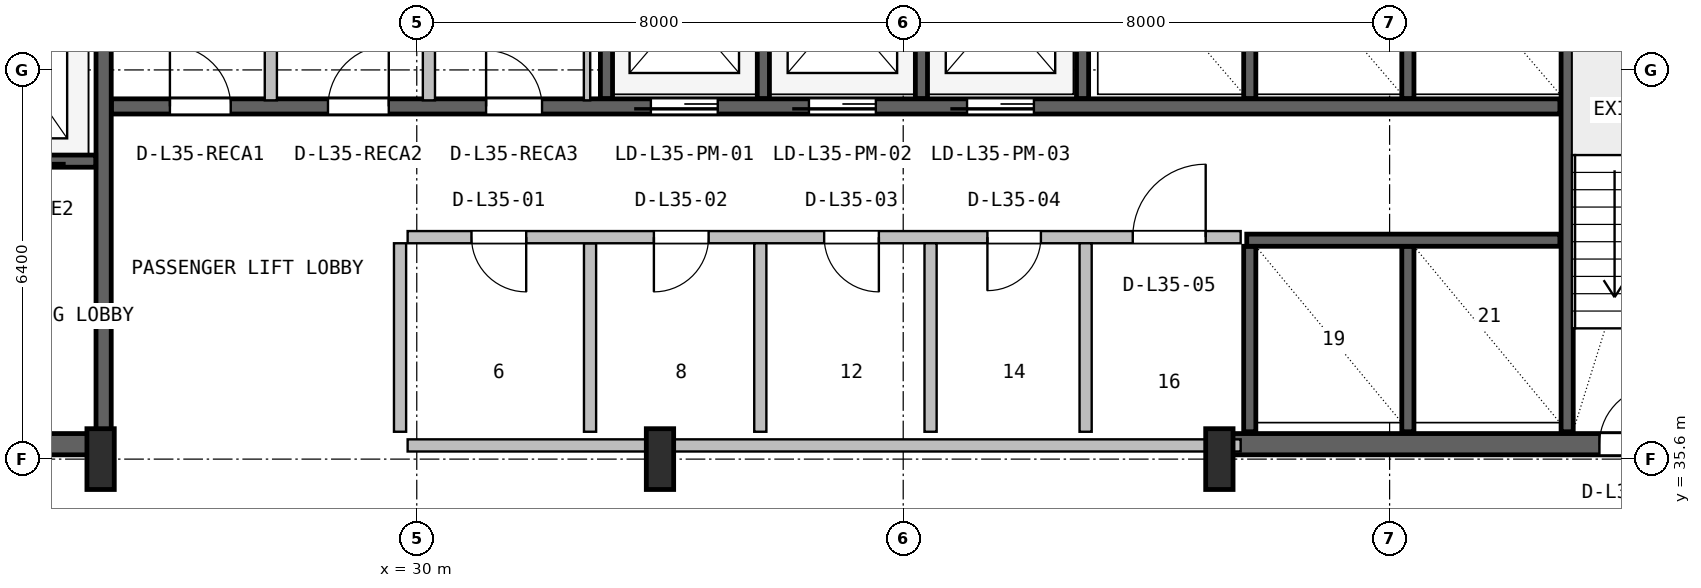
"""IFC4 building model, lengths in metres.
Left out: names, types, materials, properties, quantities, classifications, styles, units other than length and angle.
Written with IfcOpenShell. Run it as: python <this file> out.ifc"""

import sys

from ifc_helpers import new_model, si_unit, direction, frame, frame_2d, origin, origin_2d, place, context, subcontext, project, spatial, rectangle, i_section, extrude, source, transform, mapped, element, fill, save


model = new_model("IFC4")
c1 = context("Model", 3, precision=1e-05, world=origin(), true_north=direction((0.0, 1.0)))
c2 = subcontext(c1, "Body", "Model", "MODEL_VIEW")
j1 = project(units=[si_unit("LENGTHUNIT", "METRE"), si_unit("PLANEANGLEUNIT", "RADIAN")], contexts=[c1])
p1 = place(None, origin())
s1 = spatial("IfcSite", under=j1, at=p1, CompositionType="ELEMENT")
p2 = place(p1, origin())
s2 = spatial("IfcBuilding", under=s1, at=p2, CompositionType="ELEMENT")
p3 = place(p2, frame((0.0, 0.0, 145.8)))
s3 = spatial("IfcBuildingStorey", under=s2, at=p3, CompositionType="ELEMENT", Elevation=145.8)
p4 = place(p3, frame((15.67, 35.845, 0.0), z_axis=(0.0, 0.0, 1.0), x_axis=(1.0, 0.0, 0.0)))
e1 = element("IfcWall", 1, at=p4, inside=s3, PredefinedType="SHEAR", context=c2, shape_type="SweptSolid", body=[
    extrude(rectangle(XDim=9.13, YDim=0.35, at=frame_2d((4.565, 0.0))), origin(), (0.0, 0.0, 1.0), 3.55),
])
p5 = place(p4, frame((5.4, 0.0, 0.0)))
e2 = element("IfcOpeningElement", 2, at=p5, cuts=e1, PredefinedType="OPENING", context=c2, shape_type="SweptSolid", body=[
    extrude(rectangle(XDim=1.0, YDim=2.1, at=frame_2d((0.5, 1.05))), frame((0.0, 0.185, 0.0), z_axis=(0.0, -1.0, 0.0), x_axis=(1.0, 0.0, 0.0)), (0.0, 0.0, 1.0), 0.37),
])
p6 = place(p3, frame((43.2, 35.845, 0.0), z_axis=(0.0, 0.0, 1.0), x_axis=(1.0, 0.0, 0.0)))
e3 = element("IfcWall", 3, at=p6, inside=s3, PredefinedType="SHEAR", context=c2, shape_type="SweptSolid", body=[
    extrude(rectangle(XDim=9.13, YDim=0.35, at=frame_2d((4.565, 0.0))), origin(), (0.0, 0.0, 1.0), 3.55),
])
p7 = place(p6, frame((6.25, 0.0, 0.0)))
e4 = element("IfcOpeningElement", 4, at=p7, cuts=e3, PredefinedType="OPENING", context=c2, shape_type="SweptSolid", body=[
    extrude(rectangle(XDim=0.95, YDim=2.1, at=frame_2d((0.475, 1.05))), frame((0.0, 0.185, 0.0), z_axis=(0.0, -1.0, 0.0), x_axis=(1.0, 0.0, 0.0)), (0.0, 0.0, 1.0), 0.37),
])
m1 = source(origin(), c2, "Body", "SweptSolid", [
    extrude(i_section(OverallWidth=0.45, OverallDepth=1.0, WebThickness=0.016, FlangeThickness=0.03, FilletRadius=0.016, at=origin_2d()), origin(), (0.0, 0.0, 1.0), 3.8),
])
for number, where, z_axis, x_axis in (
    (5, (24.8, 35.6, 0.0), (0.0, 0.0, 1.0), (1.0, 0.0, 0.0)),
    (6, (34.0, 35.6, 0.0), (0.0, 0.0, 1.0), (1.0, 0.0, 0.0)),
    (7, (43.2, 35.6, 0.0), (0.0, 0.0, 1.0), (1.0, 0.0, 0.0)),
):
    element("IfcColumn", number, at=place(p3, frame(where, z_axis=z_axis, x_axis=x_axis)), inside=s3, PredefinedType="COLUMN", context=c2, shape_type="MappedRepresentation", body=[
        mapped(m1, transform((0.0, 0.0, 0.0), x_axis=(1.0, 0.0, 0.0), y_axis=(0.0, 1.0, 0.0), z_axis=(0.0, 0.0, 1.0), scale=1.0)),
    ])
p8 = place(p3, frame((24.85, 36.05, 0.0), z_axis=(0.0, 0.0, 1.0), x_axis=(0.0, 1.0, 0.0)))
e8 = element("IfcWall", 8, at=p8, inside=s3, PredefinedType="SHEAR", context=c2, shape_type="SweptSolid", body=[
    extrude(rectangle(XDim=10.45, YDim=0.25, at=frame_2d((5.225, 0.0))), origin(), (0.0, 0.0, 1.0), 3.55),
])
p9 = place(p3, frame((19.2, 40.5, 0.0), z_axis=(0.0, 0.0, 1.0), x_axis=(1.0, 0.0, 0.0)))
e9 = element("IfcWall", 9, at=p9, inside=s3, PredefinedType="SHEAR", context=c2, shape_type="SweptSolid", body=[
    extrude(rectangle(XDim=5.52, YDim=0.2, at=frame_2d((2.76, 0.0))), origin(), (0.0, 0.0, 1.0), 3.55),
])
p10 = place(p9, frame((1.05, 0.0, 0.0)))
e10 = element("IfcOpeningElement", 10, at=p10, cuts=e9, PredefinedType="OPENING", context=c2, shape_type="SweptSolid", body=[
    extrude(rectangle(XDim=1.1, YDim=2.18, at=frame_2d((0.55, 1.09))), frame((0.0, 0.11, 0.0), z_axis=(0.0, -1.0, 0.0), x_axis=(1.0, 0.0, 0.0)), (0.0, 0.0, 1.0), 0.22),
])
p11 = place(p9, frame((3.65, 0.0, 0.0)))
e11 = element("IfcOpeningElement", 11, at=p11, cuts=e9, PredefinedType="OPENING", context=c2, shape_type="SweptSolid", body=[
    extrude(rectangle(XDim=1.1, YDim=2.18, at=frame_2d((0.55, 1.09))), frame((0.0, 0.11, 0.0), z_axis=(0.0, -1.0, 0.0), x_axis=(1.0, 0.0, 0.0)), (0.0, 0.0, 1.0), 0.22),
])
p12 = place(p3, frame((48.92, 36.05, 0.0), z_axis=(0.0, 0.0, 1.0), x_axis=(0.0, 1.0, 0.0)))
e12 = element("IfcWall", 12, at=p12, inside=s3, PredefinedType="SHEAR", context=c2, shape_type="SweptSolid", body=[
    extrude(rectangle(XDim=10.5, YDim=0.2, at=frame_2d((5.25, 0.0))), origin(), (0.0, 0.0, 1.0), 3.55),
])
p13 = place(p3, frame((24.98, 41.4, 0.0), z_axis=(0.0, 0.0, 1.0), x_axis=(1.0, 0.0, 0.0)))
e13 = element("IfcWall", 13, at=p13, inside=s3, PredefinedType="SHEAR", context=c2, shape_type="SweptSolid", body=[
    extrude(rectangle(XDim=23.82, YDim=0.25, at=frame_2d((11.91, 0.0))), origin(), (0.0, 0.0, 1.0), 3.55),
])
p14 = place(p13, frame((8.87, 0.0, 0.0)))
e14 = element("IfcOpeningElement", 14, at=p14, cuts=e13, PredefinedType="OPENING", context=c2, shape_type="SweptSolid", body=[
    extrude(rectangle(XDim=1.1, YDim=2.18, at=frame_2d((0.55, 1.09))), frame((0.0, 0.135, 0.0), z_axis=(0.0, -1.0, 0.0), x_axis=(1.0, 0.0, 0.0)), (0.0, 0.0, 1.0), 0.27),
])
p15 = place(p13, frame((11.47, 0.0, 0.0)))
e15 = element("IfcOpeningElement", 15, at=p15, cuts=e13, PredefinedType="OPENING", context=c2, shape_type="SweptSolid", body=[
    extrude(rectangle(XDim=1.1, YDim=2.18, at=frame_2d((0.55, 1.09))), frame((0.0, 0.135, 0.0), z_axis=(0.0, -1.0, 0.0), x_axis=(1.0, 0.0, 0.0)), (0.0, 0.0, 1.0), 0.27),
])
p16 = place(p13, frame((14.07, 0.0, 0.0)))
e16 = element("IfcOpeningElement", 16, at=p16, cuts=e13, PredefinedType="OPENING", context=c2, shape_type="SweptSolid", body=[
    extrude(rectangle(XDim=1.1, YDim=2.18, at=frame_2d((0.55, 1.09))), frame((0.0, 0.135, 0.0), z_axis=(0.0, -1.0, 0.0), x_axis=(1.0, 0.0, 0.0)), (0.0, 0.0, 1.0), 0.27),
])
p17 = place(p13, frame((0.96, 0.0, 0.0)))
e17 = element("IfcOpeningElement", 17, at=p17, cuts=e13, PredefinedType="OPENING", context=c2, shape_type="SweptSolid", body=[
    extrude(rectangle(XDim=1.0, YDim=2.08, at=frame_2d((0.5, 1.04))), frame((0.0, 0.135, 0.0), z_axis=(0.0, -1.0, 0.0), x_axis=(1.0, 0.0, 0.0)), (0.0, 0.0, 1.0), 0.27),
])
p18 = place(p13, frame((3.56, 0.0, 0.0)))
e18 = element("IfcOpeningElement", 18, at=p18, cuts=e13, PredefinedType="OPENING", context=c2, shape_type="SweptSolid", body=[
    extrude(rectangle(XDim=1.0, YDim=2.08, at=frame_2d((0.5, 1.04))), frame((0.0, 0.135, 0.0), z_axis=(0.0, -1.0, 0.0), x_axis=(1.0, 0.0, 0.0)), (0.0, 0.0, 1.0), 0.27),
])
p19 = place(p13, frame((6.16, 0.0, 0.0)))
e19 = element("IfcOpeningElement", 19, at=p19, cuts=e13, PredefinedType="OPENING", context=c2, shape_type="SweptSolid", body=[
    extrude(rectangle(XDim=0.92, YDim=2.08, at=frame_2d((0.46, 1.04))), frame((0.0, 0.135, 0.0), z_axis=(0.0, -1.0, 0.0), x_axis=(1.0, 0.0, 0.0)), (0.0, 0.0, 1.0), 0.27),
])
p20 = place(p3, frame((33.12, 41.53, 0.0), z_axis=(0.0, 0.0, 1.0), x_axis=(0.0, 1.0, 0.0)))
e20 = element("IfcWall", 20, at=p20, inside=s3, PredefinedType="SHEAR", context=c2, shape_type="SweptSolid", body=[
    extrude(rectangle(XDim=5.02, YDim=0.2, at=frame_2d((2.51, 0.0))), origin(), (0.0, 0.0, 1.0), 3.55),
])
for number, where, z_axis, x_axis in (
    (21, (35.7, 41.53, 0.0), (0.0, 0.0, 1.0), (0.0, 1.0, 0.0)),
    (22, (38.3, 41.53, 0.0), (0.0, 0.0, 1.0), (0.0, 1.0, 0.0)),
):
    element("IfcWall", number, at=place(p3, frame(where, z_axis=z_axis, x_axis=x_axis)), inside=s3, PredefinedType="SHEAR", context=c2, shape_type="SweptSolid", body=[
        extrude(rectangle(XDim=2.87, YDim=0.2, at=frame_2d((1.435, 0.0))), origin(), (0.0, 0.0, 1.0), 3.55),
    ])
p21 = place(p3, frame((40.95, 41.53, 0.0), z_axis=(0.0, 0.0, 1.0), x_axis=(0.0, 1.0, 0.0)))
e23 = element("IfcWall", 23, at=p21, inside=s3, PredefinedType="SHEAR", context=c2, shape_type="SweptSolid", body=[
    extrude(rectangle(XDim=5.02, YDim=0.2, at=frame_2d((2.51, 0.0))), origin(), (0.0, 0.0, 1.0), 3.55),
])
for number, where, z_axis, x_axis in (
    (24, (43.7, 41.53, 0.0), (0.0, 0.0, 1.0), (0.0, 1.0, 0.0)),
    (25, (46.3, 41.53, 0.0), (0.0, 0.0, 1.0), (0.0, 1.0, 0.0)),
):
    element("IfcWall", number, at=place(p3, frame(where, z_axis=z_axis, x_axis=x_axis)), inside=s3, PredefinedType="SHEAR", context=c2, shape_type="SweptSolid", body=[
        extrude(rectangle(XDim=2.87, YDim=0.2, at=frame_2d((1.435, 0.0))), origin(), (0.0, 0.0, 1.0), 3.55),
    ])
for number, where, z_axis, x_axis in (
    (26, (43.7, 36.05, 0.0), (0.0, 0.0, 1.0), (0.0, 1.0, 0.0)),
    (27, (46.3, 36.05, 0.0), (0.0, 0.0, 1.0), (0.0, 1.0, 0.0)),
):
    element("IfcWall", number, at=place(p3, frame(where, z_axis=z_axis, x_axis=x_axis)), inside=s3, PredefinedType="SHEAR", context=c2, shape_type="SweptSolid", body=[
        extrude(rectangle(XDim=3.05, YDim=0.2, at=frame_2d((1.525, 0.0))), origin(), (0.0, 0.0, 1.0), 3.55),
    ])
p22 = place(p3, frame((43.65, 39.2, 0.0), z_axis=(0.0, 0.0, 1.0), x_axis=(1.0, 0.0, 0.0)))
e28 = element("IfcWall", 28, at=p22, inside=s3, PredefinedType="SHEAR", context=c2, shape_type="SweptSolid", body=[
    extrude(rectangle(XDim=5.15, YDim=0.2, at=frame_2d((2.575, 0.0))), origin(), (0.0, 0.0, 1.0), 3.55),
])
p23 = place(p3, frame((29.85, 35.825, 0.0), z_axis=(0.0, 0.0, 1.0), x_axis=(1.0, 0.0, 0.0)))
e29 = element("IfcWall", 29, at=p23, inside=s3, PredefinedType="SOLIDWALL", context=c2, shape_type="SweptSolid", body=[
    extrude(rectangle(XDim=13.7, YDim=0.2, at=frame_2d((6.85, 0.0))), origin(), (0.0, 0.0, 1.0), 2.575),
])
p24 = place(p3, frame((32.85, 36.05, 0.0), z_axis=(0.0, 0.0, 1.0), x_axis=(0.0, 1.0, 0.0)))
e30 = element("IfcWall", 30, at=p24, inside=s3, PredefinedType="PLUMBINGWALL", context=c2, shape_type="SweptSolid", body=[
    extrude(rectangle(XDim=3.1, YDim=0.2, at=frame_2d((1.55, 0.0))), origin(), (0.0, 0.0, 1.0), 3.53),
])
p25 = place(p3, frame((29.85, 39.25, 0.0), z_axis=(0.0, 0.0, 1.0), x_axis=(1.0, 0.0, 0.0)))
e31 = element("IfcWall", 31, at=p25, inside=s3, PredefinedType="SOLIDWALL", context=c2, shape_type="SweptSolid", body=[
    extrude(rectangle(XDim=13.7, YDim=0.2, at=frame_2d((6.85, 0.0))), origin(), (0.0, 0.0, 1.0), 3.53),
])
p26 = place(p25, frame((1.05, 0.0, 0.0)))
e32 = element("IfcOpeningElement", 32, at=p26, cuts=e31, PredefinedType="OPENING", context=c2, shape_type="SweptSolid", body=[
    extrude(rectangle(XDim=0.9, YDim=2.06, at=frame_2d((0.45, 1.03))), frame((0.0, 0.11, 0.0), z_axis=(0.0, -1.0, 0.0), x_axis=(1.0, 0.0, 0.0)), (0.0, 0.0, 1.0), 0.22),
])
p27 = place(p25, frame((4.05, 0.0, 0.0)))
e33 = element("IfcOpeningElement", 33, at=p27, cuts=e31, PredefinedType="OPENING", context=c2, shape_type="SweptSolid", body=[
    extrude(rectangle(XDim=0.9, YDim=2.06, at=frame_2d((0.45, 1.03))), frame((0.0, 0.11, 0.0), z_axis=(0.0, -1.0, 0.0), x_axis=(1.0, 0.0, 0.0)), (0.0, 0.0, 1.0), 0.22),
])
p28 = place(p25, frame((6.85, 0.0, 0.0)))
e34 = element("IfcOpeningElement", 34, at=p28, cuts=e31, PredefinedType="OPENING", context=c2, shape_type="SweptSolid", body=[
    extrude(rectangle(XDim=0.9, YDim=2.06, at=frame_2d((0.45, 1.03))), frame((0.0, 0.11, 0.0), z_axis=(0.0, -1.0, 0.0), x_axis=(1.0, 0.0, 0.0)), (0.0, 0.0, 1.0), 0.22),
])
p29 = place(p25, frame((9.535, 0.0, 0.0)))
e35 = element("IfcOpeningElement", 35, at=p29, cuts=e31, PredefinedType="OPENING", context=c2, shape_type="SweptSolid", body=[
    extrude(rectangle(XDim=0.88, YDim=2.06, at=frame_2d((0.44, 1.03))), frame((0.0, 0.11, 0.0), z_axis=(0.0, -1.0, 0.0), x_axis=(1.0, 0.0, 0.0)), (0.0, 0.0, 1.0), 0.22),
])
p30 = place(p25, frame((11.925, 0.0, 0.0)))
e36 = element("IfcOpeningElement", 36, at=p30, cuts=e31, PredefinedType="OPENING", context=c2, shape_type="SweptSolid", body=[
    extrude(rectangle(XDim=1.2, YDim=2.1, at=frame_2d((0.6, 1.05))), frame((0.0, 0.11, 0.0), z_axis=(0.0, -1.0, 0.0), x_axis=(1.0, 0.0, 0.0)), (0.0, 0.0, 1.0), 0.22),
])
for number, where, z_axis, x_axis in (
    (37, (29.725, 36.05, 0.0), (0.0, 0.0, 1.0), (0.0, 1.0, 0.0)),
    (38, (35.65, 36.05, 0.0), (0.0, 0.0, 1.0), (0.0, 1.0, 0.0)),
    (39, (38.45, 36.05, 0.0), (0.0, 0.0, 1.0), (0.0, 1.0, 0.0)),
):
    element("IfcWall", number, at=place(p3, frame(where, z_axis=z_axis, x_axis=x_axis)), inside=s3, PredefinedType="PLUMBINGWALL", context=c2, shape_type="SweptSolid", body=[
        extrude(rectangle(XDim=3.1, YDim=0.2, at=frame_2d((1.55, 0.0))), origin(), (0.0, 0.0, 1.0), 3.53),
    ])
p31 = place(p3, frame((41.0, 36.05, 0.0), z_axis=(0.0, 0.0, 1.0), x_axis=(0.0, 1.0, 0.0)))
e40 = element("IfcWall", 40, at=p31, inside=s3, PredefinedType="SOLIDWALL", context=c2, shape_type="SweptSolid", body=[
    extrude(rectangle(XDim=3.1, YDim=0.2, at=frame_2d((1.55, 0.0))), origin(), (0.0, 0.0, 1.0), 3.53),
])
for number, where, z_axis, x_axis in (
    (41, (27.6, 41.5, 0.0), (0.0, 0.0, 1.0), (0.0, 1.0, 0.0)),
    (42, (30.2, 41.5, 0.0), (0.0, 0.0, 1.0), (0.0, 1.0, 0.0)),
):
    element("IfcWall", number, at=place(p3, frame(where, z_axis=z_axis, x_axis=x_axis)), inside=s3, PredefinedType="SOLIDWALL", context=c2, shape_type="SweptSolid", body=[
        extrude(rectangle(XDim=5.02, YDim=0.2, at=frame_2d((2.51, 0.0))), origin(), (0.0, 0.0, 1.0), 3.53),
    ])
p32 = place(p3, frame((32.8, 41.5, 0.0), z_axis=(0.0, 0.0, 1.0), x_axis=(0.0, 1.0, 0.0)))
e43 = element("IfcWall", 43, at=p32, inside=s3, PredefinedType="PARTITIONING", context=c2, shape_type="SweptSolid", body=[
    extrude(rectangle(XDim=5.02, YDim=0.105, at=frame_2d((2.51, 0.0))), origin(), (0.0, 0.0, 1.0), 3.53),
])
m2 = source(origin(), c2, "Body", "SweptSolid", [
    extrude(rectangle(XDim=0.95, YDim=2.1, at=frame_2d((0.475, 1.05))), frame((0.0, 0.025, 0.0), z_axis=(0.0, -1.0, 0.0), x_axis=(1.0, 0.0, 0.0)), (0.0, 0.0, 1.0), 0.05),
])
p33 = place(p7, origin())
e44 = element("IfcDoor", 44, at=p33, inside=s3, OperationType="SINGLE_SWING_RIGHT", PredefinedType="DOOR", context=c2, shape_type="MappedRepresentation", body=[
    mapped(m2, transform((0.0, 0.0, 0.0), x_axis=(1.0, 0.0, 0.0), y_axis=(0.0, 1.0, 0.0), z_axis=(0.0, 0.0, 1.0), scale=1.0)),
])
fill(e4, e44)
m3 = source(origin(), c2, "Body", "SweptSolid", [
    extrude(rectangle(XDim=1.1, YDim=2.18, at=frame_2d((0.55, 1.09))), frame((0.0, 0.025, 0.0), z_axis=(0.0, -1.0, 0.0), x_axis=(1.0, 0.0, 0.0)), (0.0, 0.0, 1.0), 0.05),
])
p34 = place(p14, frame((1.1, 0.0, 0.0), z_axis=(0.0, 0.0, 1.0), x_axis=(-1.0, 0.0, 0.0)))
e45 = element("IfcDoor", 45, at=p34, inside=s3, OperationType="SLIDING_TO_LEFT", PredefinedType="DOOR", context=c2, shape_type="MappedRepresentation", body=[
    mapped(m3, transform((0.0, 0.0, 0.0), x_axis=(1.0, 0.0, 0.0), y_axis=(0.0, 1.0, 0.0), z_axis=(0.0, 0.0, 1.0), scale=1.0)),
])
fill(e14, e45)
p35 = place(p15, frame((1.1, 0.0, 0.0), z_axis=(0.0, 0.0, 1.0), x_axis=(-1.0, 0.0, 0.0)))
e46 = element("IfcDoor", 46, at=p35, inside=s3, OperationType="SLIDING_TO_LEFT", PredefinedType="DOOR", context=c2, shape_type="MappedRepresentation", body=[
    mapped(m3, transform((0.0, 0.0, 0.0), x_axis=(1.0, 0.0, 0.0), y_axis=(0.0, 1.0, 0.0), z_axis=(0.0, 0.0, 1.0), scale=1.0)),
])
fill(e15, e46)
p36 = place(p16, frame((1.1, 0.0, 0.0), z_axis=(0.0, 0.0, 1.0), x_axis=(-1.0, 0.0, 0.0)))
e47 = element("IfcDoor", 47, at=p36, inside=s3, OperationType="SLIDING_TO_LEFT", PredefinedType="DOOR", context=c2, shape_type="MappedRepresentation", body=[
    mapped(m3, transform((0.0, 0.0, 0.0), x_axis=(1.0, 0.0, 0.0), y_axis=(0.0, 1.0, 0.0), z_axis=(0.0, 0.0, 1.0), scale=1.0)),
])
fill(e16, e47)
m4 = source(origin(), c2, "Body", "SweptSolid", [
    extrude(rectangle(XDim=1.0, YDim=2.08, at=frame_2d((0.5, 1.04))), frame((0.0, 0.025, 0.0), z_axis=(0.0, -1.0, 0.0), x_axis=(1.0, 0.0, 0.0)), (0.0, 0.0, 1.0), 0.05),
])
p37 = place(p17, origin())
e48 = element("IfcDoor", 48, at=p37, inside=s3, OperationType="SINGLE_SWING_LEFT", PredefinedType="DOOR", context=c2, shape_type="MappedRepresentation", body=[
    mapped(m4, transform((0.0, 0.0, 0.0), x_axis=(1.0, 0.0, 0.0), y_axis=(0.0, 1.0, 0.0), z_axis=(0.0, 0.0, 1.0), scale=1.0)),
])
fill(e17, e48)
p38 = place(p18, origin())
e49 = element("IfcDoor", 49, at=p38, inside=s3, OperationType="SINGLE_SWING_RIGHT", PredefinedType="DOOR", context=c2, shape_type="MappedRepresentation", body=[
    mapped(m4, transform((0.0, 0.0, 0.0), x_axis=(1.0, 0.0, 0.0), y_axis=(0.0, 1.0, 0.0), z_axis=(0.0, 0.0, 1.0), scale=1.0)),
])
fill(e18, e49)
m5 = source(origin(), c2, "Body", "SweptSolid", [
    extrude(rectangle(XDim=0.92, YDim=2.08, at=frame_2d((0.46, 1.04))), frame((0.0, 0.025, 0.0), z_axis=(0.0, -1.0, 0.0), x_axis=(1.0, 0.0, 0.0)), (0.0, 0.0, 1.0), 0.05),
])
p39 = place(p19, origin())
e50 = element("IfcDoor", 50, at=p39, inside=s3, OperationType="SINGLE_SWING_LEFT", PredefinedType="DOOR", context=c2, shape_type="MappedRepresentation", body=[
    mapped(m5, transform((0.0, 0.0, 0.0), x_axis=(1.0, 0.0, 0.0), y_axis=(0.0, 1.0, 0.0), z_axis=(0.0, 0.0, 1.0), scale=1.0)),
])
fill(e19, e50)
m6 = source(origin(), c2, "Body", "SweptSolid", [
    extrude(rectangle(XDim=0.9, YDim=2.06, at=frame_2d((0.45, 1.03))), frame((0.0, 0.025, 0.0), z_axis=(0.0, -1.0, 0.0), x_axis=(1.0, 0.0, 0.0)), (0.0, 0.0, 1.0), 0.05),
])
p40 = place(p26, frame((0.9, 0.0, 0.0), z_axis=(0.0, 0.0, 1.0), x_axis=(-1.0, 0.0, 0.0)))
e51 = element("IfcDoor", 51, at=p40, inside=s3, OperationType="SINGLE_SWING_RIGHT", PredefinedType="DOOR", context=c2, shape_type="MappedRepresentation", body=[
    mapped(m6, transform((0.0, 0.0, 0.0), x_axis=(1.0, 0.0, 0.0), y_axis=(0.0, 1.0, 0.0), z_axis=(0.0, 0.0, 1.0), scale=1.0)),
])
fill(e32, e51)
p41 = place(p27, frame((0.9, 0.0, 0.0), z_axis=(0.0, 0.0, 1.0), x_axis=(-1.0, 0.0, 0.0)))
e52 = element("IfcDoor", 52, at=p41, inside=s3, OperationType="SINGLE_SWING_LEFT", PredefinedType="DOOR", context=c2, shape_type="MappedRepresentation", body=[
    mapped(m6, transform((0.0, 0.0, 0.0), x_axis=(1.0, 0.0, 0.0), y_axis=(0.0, 1.0, 0.0), z_axis=(0.0, 0.0, 1.0), scale=1.0)),
])
fill(e33, e52)
p42 = place(p28, frame((0.9, 0.0, 0.0), z_axis=(0.0, 0.0, 1.0), x_axis=(-1.0, 0.0, 0.0)))
e53 = element("IfcDoor", 53, at=p42, inside=s3, OperationType="SINGLE_SWING_RIGHT", PredefinedType="DOOR", context=c2, shape_type="MappedRepresentation", body=[
    mapped(m6, transform((0.0, 0.0, 0.0), x_axis=(1.0, 0.0, 0.0), y_axis=(0.0, 1.0, 0.0), z_axis=(0.0, 0.0, 1.0), scale=1.0)),
])
fill(e34, e53)
m7 = source(origin(), c2, "Body", "SweptSolid", [
    extrude(rectangle(XDim=0.88, YDim=2.06, at=frame_2d((0.44, 1.03))), frame((0.0, 0.025, 0.0), z_axis=(0.0, -1.0, 0.0), x_axis=(1.0, 0.0, 0.0)), (0.0, 0.0, 1.0), 0.05),
])
p43 = place(p29, frame((0.88, 0.0, 0.0), z_axis=(0.0, 0.0, 1.0), x_axis=(-1.0, 0.0, 0.0)))
e54 = element("IfcDoor", 54, at=p43, inside=s3, OperationType="SINGLE_SWING_LEFT", PredefinedType="DOOR", context=c2, shape_type="MappedRepresentation", body=[
    mapped(m7, transform((0.0, 0.0, 0.0), x_axis=(1.0, 0.0, 0.0), y_axis=(0.0, 1.0, 0.0), z_axis=(0.0, 0.0, 1.0), scale=1.0)),
])
fill(e35, e54)
m8 = source(origin(), c2, "Body", "SweptSolid", [
    extrude(rectangle(XDim=1.2, YDim=2.1, at=frame_2d((0.6, 1.05))), frame((0.0, 0.025, 0.0), z_axis=(0.0, -1.0, 0.0), x_axis=(1.0, 0.0, 0.0)), (0.0, 0.0, 1.0), 0.05),
])
p44 = place(p30, origin())
e55 = element("IfcDoor", 55, at=p44, inside=s3, OperationType="SINGLE_SWING_RIGHT", PredefinedType="DOOR", context=c2, shape_type="MappedRepresentation", body=[
    mapped(m8, transform((0.0, 0.0, 0.0), x_axis=(1.0, 0.0, 0.0), y_axis=(0.0, 1.0, 0.0), z_axis=(0.0, 0.0, 1.0), scale=1.0)),
])
fill(e36, e55)
save(model, sys.argv[1])
